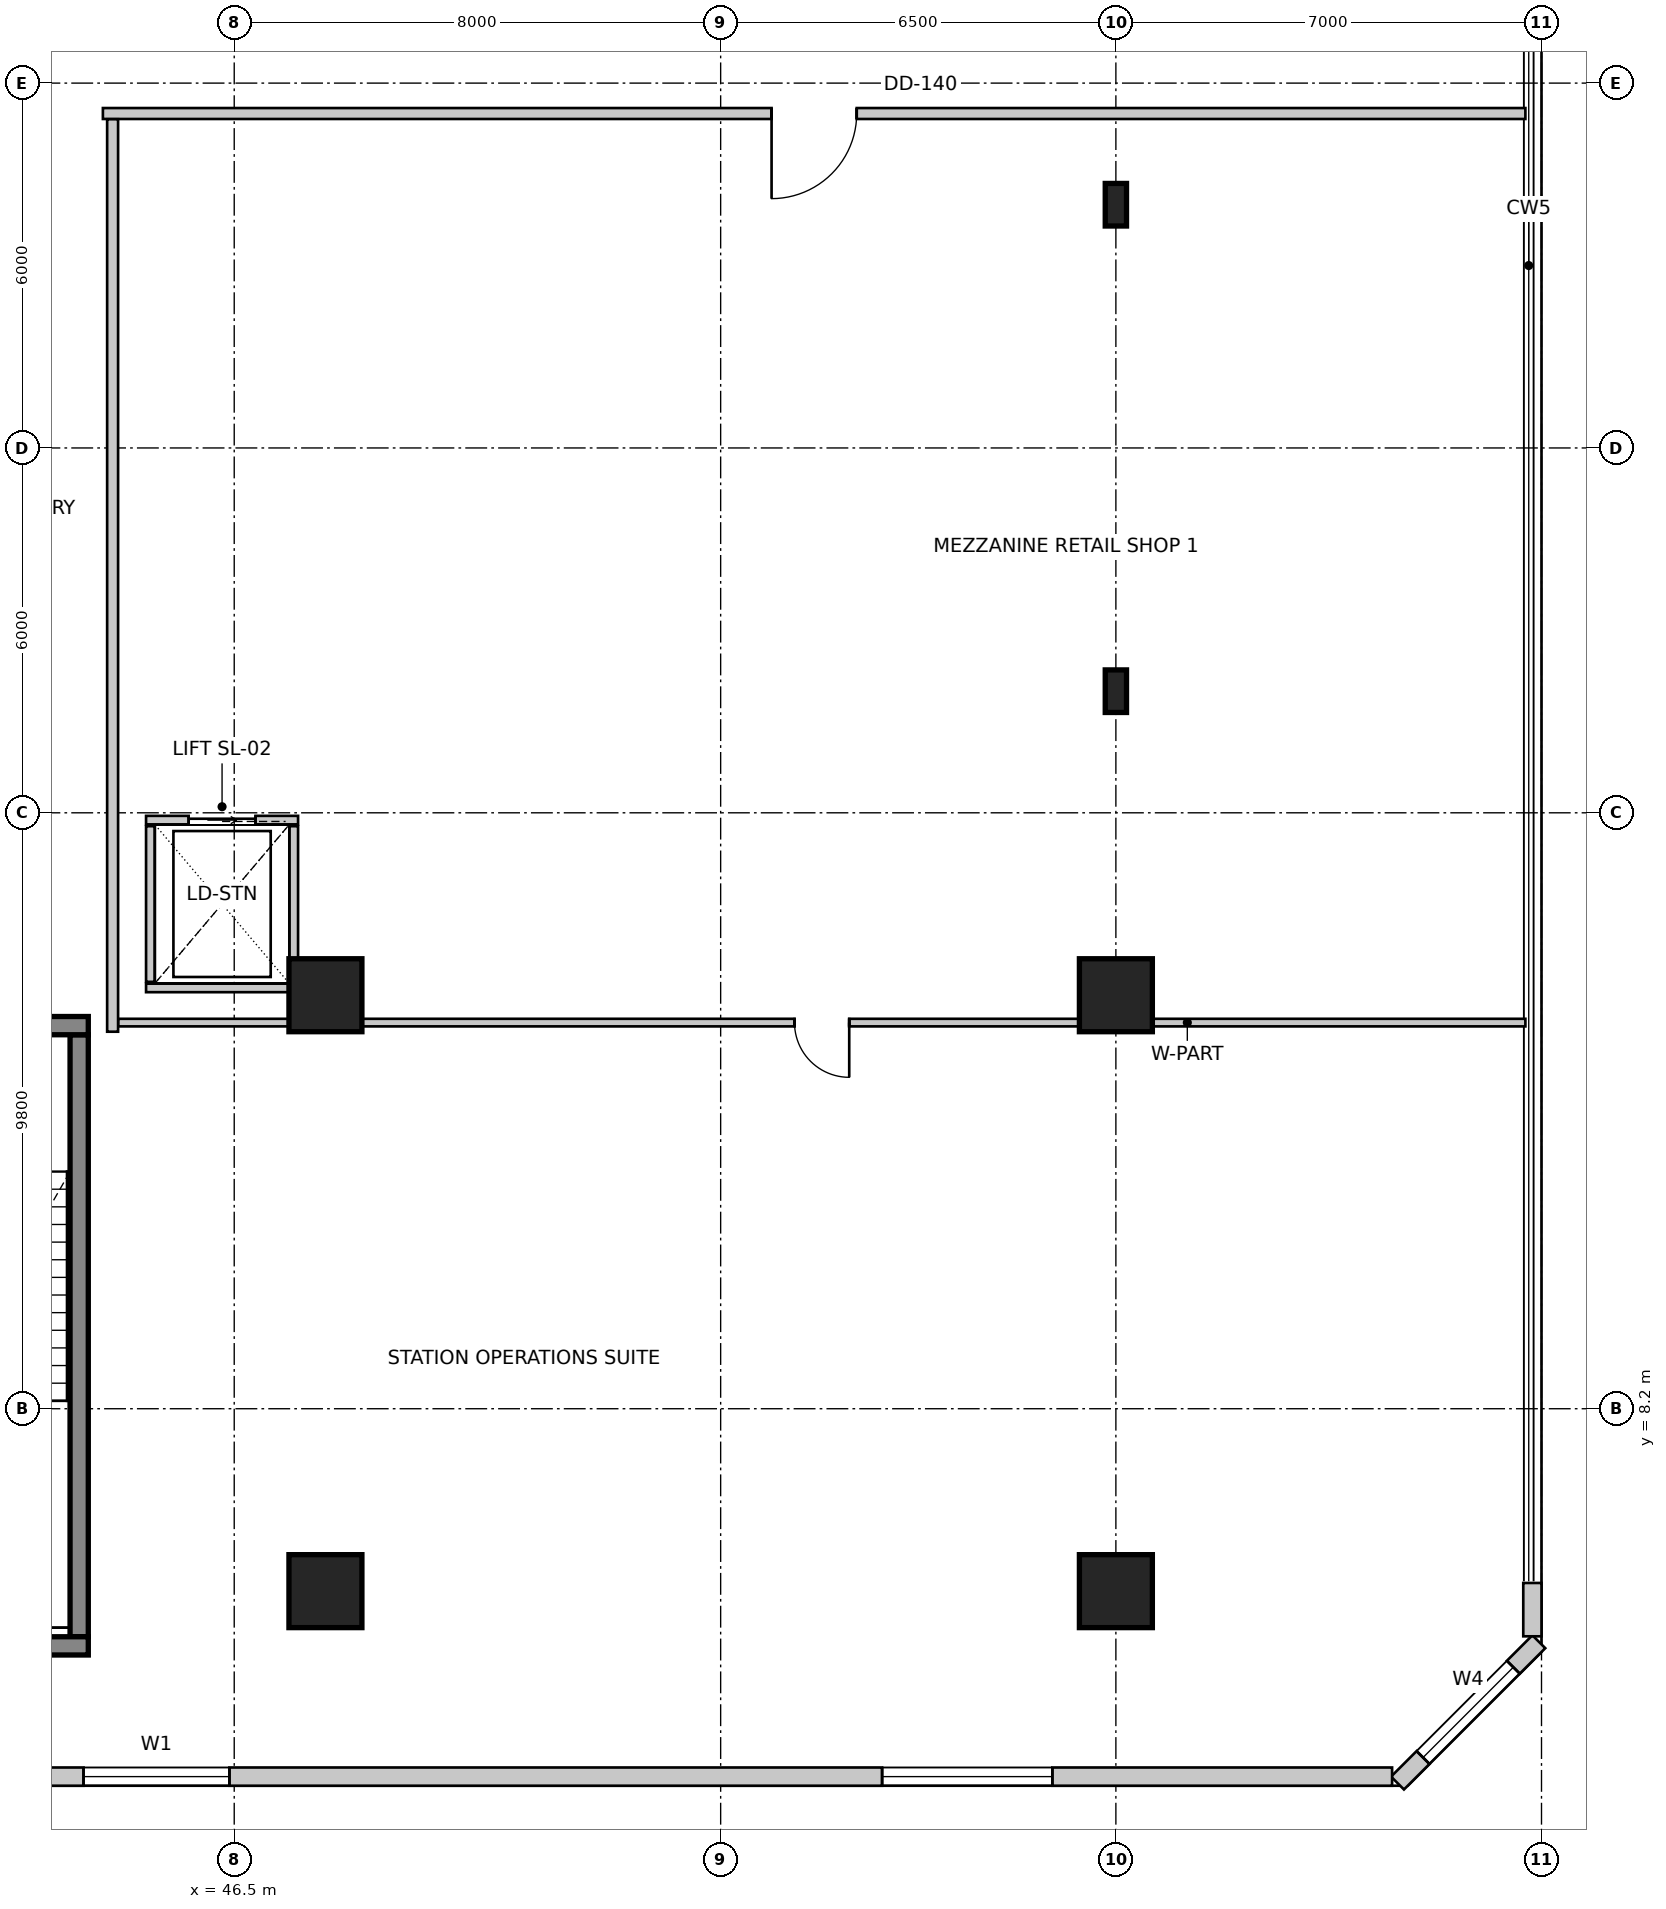
"""IFC4 building model, lengths in metres.
Left out: names, types, materials, properties, quantities, classifications, styles, units other than length and angle.
Written with IfcOpenShell. Run it as: python <this file> out.ifc"""

import sys

from ifc_helpers import new_model, si_unit, direction, frame, frame_2d, origin, origin_2d, place, context, subcontext, project, spatial, rectangle, extrude, source, transform, mapped, element, fill, save


model = new_model("IFC4")
c1 = context("Model", 3, precision=1e-05, world=origin(), true_north=direction((0.0, 1.0)))
c2 = subcontext(c1, "Body", "Model", "MODEL_VIEW")
j1 = project(units=[si_unit("LENGTHUNIT", "METRE"), si_unit("PLANEANGLEUNIT", "RADIAN")], contexts=[c1])
p1 = place(None, origin())
s1 = spatial("IfcSite", under=j1, at=p1, CompositionType="ELEMENT")
p2 = place(p1, origin())
s2 = spatial("IfcBuilding", under=s1, at=p2, CompositionType="ELEMENT")
p3 = place(p2, frame((0.0, 0.0, 6.0)))
s3 = spatial("IfcBuildingStorey", under=s2, at=p3, CompositionType="ELEMENT", Elevation=6.0)
p4 = place(p3, frame((43.95, 4.45, 0.0), z_axis=(0.0, 0.0, 1.0), x_axis=(0.0, 1.0, 0.0)))
e1 = element("IfcWall", 1, at=p4, inside=s3, PredefinedType="SHEAR", context=c2, shape_type="SweptSolid", body=[
    extrude(rectangle(XDim=9.9, YDim=0.3, at=frame_2d((4.95, 0.0))), origin(), (0.0, 0.0, 1.0), 5.2),
])
p5 = place(p3, frame((39.2, 4.3, 0.0), z_axis=(0.0, 0.0, 1.0), x_axis=(1.0, 0.0, 0.0)))
e2 = element("IfcWall", 2, at=p5, inside=s3, PredefinedType="SHEAR", context=c2, shape_type="SweptSolid", body=[
    extrude(rectangle(XDim=4.9, YDim=0.3, at=frame_2d((2.45, 0.0))), origin(), (0.0, 0.0, 1.0), 5.2),
])
p6 = place(p3, frame((39.2, 14.5, 0.0), z_axis=(0.0, 0.0, 1.0), x_axis=(1.0, 0.0, 0.0)))
e3 = element("IfcWall", 3, at=p6, inside=s3, PredefinedType="SHEAR", context=c2, shape_type="SweptSolid", body=[
    extrude(rectangle(XDim=4.9, YDim=0.3, at=frame_2d((2.45, 0.0))), origin(), (0.0, 0.0, 1.0), 5.2),
])
m1 = source(origin(), c2, "Body", "SweptSolid", [
    extrude(rectangle(XDim=1.1, YDim=2.15, at=frame_2d((0.55, 1.075))), frame((0.0, 0.16, 0.0), z_axis=(0.0, -1.0, 0.0), x_axis=(1.0, 0.0, 0.0)), (0.0, 0.0, 1.0), 0.32),
])
p7 = place(p6, frame((1.9, 0.0, 0.0)))
e4 = element("IfcOpeningElement", 4, at=p7, cuts=e3, PredefinedType="OPENING", context=c2, shape_type="MappedRepresentation", body=[
    mapped(m1, transform((0.0, 0.0, 0.0), scale=1.0)),
])
m2 = source(origin(), c2, "Body", "SweptSolid", [
    extrude(rectangle(XDim=1.2, YDim=1.2, at=origin_2d()), origin(), (0.0, 0.0, 1.0), 5.2),
])
for number, where, z_axis, x_axis in (
    (5, (48.0, 5.2, 0.0), (0.0, 0.0, 1.0), (1.0, 0.0, 0.0)),
    (6, (61.0, 5.2, 0.0), (0.0, 0.0, 1.0), (1.0, 0.0, 0.0)),
    (7, (48.0, 15.0, 0.0), (0.0, 0.0, 1.0), (1.0, 0.0, 0.0)),
    (8, (61.0, 15.0, 0.0), (0.0, 0.0, 1.0), (1.0, 0.0, 0.0)),
):
    element("IfcColumn", number, at=place(p3, frame(where, z_axis=z_axis, x_axis=x_axis)), inside=s3, PredefinedType="COLUMN", context=c2, shape_type="MappedRepresentation", body=[
        mapped(m2, transform((0.0, 0.0, 0.0), scale=1.0)),
    ])
m3 = source(origin(), c2, "Body", "SweptSolid", [
    extrude(rectangle(XDim=0.35, YDim=0.7, at=origin_2d()), origin(), (0.0, 0.0, 1.0), 5.2),
])
for number, where, z_axis, x_axis in (
    (9, (61.0, 20.0, 0.0), (0.0, 0.0, 1.0), (1.0, 0.0, 0.0)),
    (10, (61.0, 28.0, 0.0), (0.0, 0.0, 1.0), (1.0, 0.0, 0.0)),
):
    element("IfcColumn", number, at=place(p3, frame(where, z_axis=z_axis, x_axis=x_axis)), inside=s3, PredefinedType="PILASTER", context=c2, shape_type="MappedRepresentation", body=[
        mapped(m3, transform((0.0, 0.0, 0.0), scale=1.0)),
    ])
p8 = place(p3, frame((65.632, 2.044, 0.0), z_axis=(0.0, 0.0, 1.0), x_axis=(0.707106781187, 0.707106781187, 0.0)))
e11 = element("IfcWall", 11, at=p8, inside=s3, PredefinedType="SOLIDWALL", context=c2, shape_type="SweptSolid", body=[
    extrude(rectangle(XDim=3.287, YDim=0.3, at=frame_2d((1.644, 0.0))), origin(), (0.0, 0.0, 1.0), 4.9),
])
m4 = source(origin(), c2, "Body", "SweptSolid", [
    extrude(rectangle(XDim=2.1, YDim=2.0, at=frame_2d((1.05, 1.0))), frame((0.0, 0.16, 0.0), z_axis=(0.0, -1.0, 0.0), x_axis=(1.0, 0.0, 0.0)), (0.0, 0.0, 1.0), 0.32),
])
p9 = place(p8, frame((0.594, 0.0, 0.85)))
e12 = element("IfcOpeningElement", 12, at=p9, cuts=e11, PredefinedType="OPENING", context=c2, shape_type="MappedRepresentation", body=[
    mapped(m4, transform((0.0, 0.0, 0.0), scale=1.0)),
])
p10 = place(p3, frame((67.85, 4.457, 0.0), z_axis=(0.0, 0.0, 1.0), x_axis=(0.0, 1.0, 0.0)))
e13 = element("IfcWall", 13, at=p10, inside=s3, PredefinedType="SOLIDWALL", context=c2, shape_type="SweptSolid", body=[
    extrude(rectangle(XDim=0.877, YDim=0.3, at=frame_2d((0.439, 0.0))), origin(), (0.0, 0.0, 1.0), 4.9),
])
p11 = place(p3, frame((4.457, 2.15, 0.0), z_axis=(0.0, 0.0, 1.0), x_axis=(1.0, 0.0, 0.0)))
e14 = element("IfcWall", 14, at=p11, inside=s3, PredefinedType="SOLIDWALL", context=c2, shape_type="SweptSolid", body=[
    extrude(rectangle(XDim=61.085, YDim=0.3, at=frame_2d((30.543, 0.0))), origin(), (0.0, 0.0, 1.0), 4.9),
])
m5 = source(origin(), c2, "Body", "SweptSolid", [
    extrude(rectangle(XDim=2.8, YDim=2.4, at=frame_2d((1.4, 1.2))), frame((0.0, 0.16, 0.0), z_axis=(0.0, -1.0, 0.0), x_axis=(1.0, 0.0, 0.0)), (0.0, 0.0, 1.0), 0.32),
])
p12 = place(p11, frame((2.254, 0.0, 0.85)))
e15 = element("IfcOpeningElement", 15, at=p12, cuts=e14, PredefinedType="OPENING", context=c2, shape_type="MappedRepresentation", body=[
    mapped(m5, transform((0.0, 0.0, 0.0), scale=1.0)),
])
m6 = source(origin(), c2, "Body", "SweptSolid", [
    extrude(rectangle(XDim=2.4, YDim=2.2, at=frame_2d((1.2, 1.1))), frame((0.0, 0.16, 0.0), z_axis=(0.0, -1.0, 0.0), x_axis=(1.0, 0.0, 0.0)), (0.0, 0.0, 1.0), 0.32),
])
p13 = place(p11, frame((9.121, 0.0, 0.85)))
e16 = element("IfcOpeningElement", 16, at=p13, cuts=e14, PredefinedType="OPENING", context=c2, shape_type="MappedRepresentation", body=[
    mapped(m6, transform((0.0, 0.0, 0.0), scale=1.0)),
])
p14 = place(p11, frame((15.589, 0.0, 0.85)))
e17 = element("IfcOpeningElement", 17, at=p14, cuts=e14, PredefinedType="OPENING", context=c2, shape_type="MappedRepresentation", body=[
    mapped(m5, transform((0.0, 0.0, 0.0), scale=1.0)),
])
p15 = place(p11, frame((26.03, 0.0, 0.85)))
e18 = element("IfcOpeningElement", 18, at=p15, cuts=e14, PredefinedType="OPENING", context=c2, shape_type="MappedRepresentation", body=[
    mapped(m5, transform((0.0, 0.0, 0.0), scale=1.0)),
])
p16 = place(p11, frame((39.564, 0.0, 0.85)))
e19 = element("IfcOpeningElement", 19, at=p16, cuts=e14, PredefinedType="OPENING", context=c2, shape_type="MappedRepresentation", body=[
    mapped(m6, transform((0.0, 0.0, 0.0), scale=1.0)),
])
p17 = place(p11, frame((52.698, 0.0, 0.85)))
e20 = element("IfcOpeningElement", 20, at=p17, cuts=e14, PredefinedType="OPENING", context=c2, shape_type="MappedRepresentation", body=[
    mapped(m5, transform((0.0, 0.0, 0.0), scale=1.0)),
])
p18 = place(p3, frame((45.05, 17.88, 0.0), z_axis=(0.0, 0.0, 1.0), x_axis=(1.0, 0.0, 0.0)))
e21 = element("IfcWall", 21, at=p18, inside=s3, PredefinedType="SOLIDWALL", context=c2, shape_type="SweptSolid", body=[
    extrude(rectangle(XDim=2.5, YDim=0.14, at=frame_2d((1.25, 0.0))), origin(), (0.0, 0.0, 1.0), 4.9),
])
m7 = source(origin(), c2, "Body", "SweptSolid", [
    extrude(rectangle(XDim=1.1, YDim=2.15, at=frame_2d((0.55, 1.075))), frame((0.0, 0.08, 0.0), z_axis=(0.0, -1.0, 0.0), x_axis=(1.0, 0.0, 0.0)), (0.0, 0.0, 1.0), 0.16),
])
p19 = place(p18, frame((0.7, 0.0, 0.0)))
e22 = element("IfcOpeningElement", 22, at=p19, cuts=e21, PredefinedType="OPENING", context=c2, shape_type="MappedRepresentation", body=[
    mapped(m7, transform((0.0, 0.0, 0.0), scale=1.0)),
])
p20 = place(p3, frame((45.05, 15.12, 0.0), z_axis=(0.0, 0.0, 1.0), x_axis=(1.0, 0.0, 0.0)))
e23 = element("IfcWall", 23, at=p20, inside=s3, PredefinedType="SOLIDWALL", context=c2, shape_type="SweptSolid", body=[
    extrude(rectangle(XDim=2.5, YDim=0.14, at=frame_2d((1.25, 0.0))), origin(), (0.0, 0.0, 1.0), 3.692),
])
p21 = place(p3, frame((45.12, 15.22, 0.0), z_axis=(0.0, 0.0, 1.0), x_axis=(0.0, 1.0, 0.0)))
e24 = element("IfcWall", 24, at=p21, inside=s3, PredefinedType="SOLIDWALL", context=c2, shape_type="SweptSolid", body=[
    extrude(rectangle(XDim=2.56, YDim=0.14, at=frame_2d((1.28, 0.0))), origin(), (0.0, 0.0, 1.0), 3.692),
])
p22 = place(p3, frame((47.48, 15.22, 0.0), z_axis=(0.0, 0.0, 1.0), x_axis=(0.0, 1.0, 0.0)))
e25 = element("IfcWall", 25, at=p22, inside=s3, PredefinedType="SOLIDWALL", context=c2, shape_type="SweptSolid", body=[
    extrude(rectangle(XDim=2.56, YDim=0.14, at=frame_2d((1.28, 0.0))), origin(), (0.0, 0.0, 1.0), 3.092),
])
p23 = place(p3, frame((67.735, 29.5, 0.0), z_axis=(0.0, 0.0, 1.0), x_axis=(-1.0, 0.0, 0.0)))
e26 = element("IfcWall", 26, at=p23, inside=s3, PredefinedType="PARTITIONING", context=c2, shape_type="SweptSolid", body=[
    extrude(rectangle(XDim=23.395, YDim=0.18, at=frame_2d((11.698, 0.0))), origin(), (0.0, 0.0, 1.0), 3.092),
])
m8 = source(origin(), c2, "Body", "SweptSolid", [
    extrude(rectangle(XDim=1.4, YDim=2.15, at=frame_2d((0.7, 1.075))), frame((0.0, 0.1, 0.0), z_axis=(0.0, -1.0, 0.0), x_axis=(1.0, 0.0, 0.0)), (0.0, 0.0, 1.0), 0.2),
])
p24 = place(p23, frame((10.998, 0.0, 0.0)))
e27 = element("IfcOpeningElement", 27, at=p24, cuts=e26, PredefinedType="OPENING", context=c2, shape_type="MappedRepresentation", body=[
    mapped(m8, transform((0.0, 0.0, 0.0), scale=1.0)),
])
p25 = place(p3, frame((44.5, 29.406, 0.0), z_axis=(0.0, 0.0, 1.0), x_axis=(0.0, -1.0, 0.0)))
e28 = element("IfcWall", 28, at=p25, inside=s3, PredefinedType="PARTITIONING", context=c2, shape_type="SweptSolid", body=[
    extrude(rectangle(XDim=15.006, YDim=0.18, at=frame_2d((7.503, 0.0))), origin(), (0.0, 0.0, 1.0), 3.692),
])
p26 = place(p3, frame((67.735, 14.55, 0.0), z_axis=(0.0, 0.0, 1.0), x_axis=(-1.0, 0.0, 0.0)))
e29 = element("IfcWall", 29, at=p26, inside=s3, PredefinedType="PARTITIONING", context=c2, shape_type="SweptSolid", body=[
    extrude(rectangle(XDim=23.141, YDim=0.125, at=frame_2d((11.571, 0.0))), origin(), (0.0, 0.0, 1.0), 3.942),
])
m9 = source(origin(), c2, "Body", "SweptSolid", [
    extrude(rectangle(XDim=0.9, YDim=2.15, at=frame_2d((0.45, 1.075))), frame((0.0, 0.073, 0.0), z_axis=(0.0, -1.0, 0.0), x_axis=(1.0, 0.0, 0.0)), (0.0, 0.0, 1.0), 0.145),
])
p27 = place(p26, frame((11.121, 0.0, 0.0)))
e30 = element("IfcOpeningElement", 30, at=p27, cuts=e29, PredefinedType="OPENING", context=c2, shape_type="MappedRepresentation", body=[
    mapped(m9, transform((0.0, 0.0, 0.0), scale=1.0)),
])
m10 = source(origin(), c2, "Body", "SweptSolid", [
    extrude(rectangle(XDim=2.1, YDim=2.0, at=frame_2d((1.05, 1.0))), frame((0.0, -0.015, 0.0), z_axis=(0.0, -1.0, 0.0), x_axis=(1.0, 0.0, 0.0)), (0.0, 0.0, 1.0), 0.06),
])
p28 = place(p9, origin())
e31 = element("IfcWindow", 31, at=p28, inside=s3, PartitioningType="SINGLE_PANEL", PredefinedType="WINDOW", context=c2, shape_type="MappedRepresentation", body=[
    mapped(m10, transform((0.0, 0.0, 0.0), scale=1.0)),
])
fill(e12, e31)
m11 = source(origin(), c2, "Body", "SweptSolid", [
    extrude(rectangle(XDim=2.4, YDim=2.2, at=frame_2d((1.2, 1.1))), frame((0.0, -0.015, 0.0), z_axis=(0.0, -1.0, 0.0), x_axis=(1.0, 0.0, 0.0)), (0.0, 0.0, 1.0), 0.06),
])
p29 = place(p16, origin())
e32 = element("IfcWindow", 32, at=p29, inside=s3, PartitioningType="SINGLE_PANEL", PredefinedType="WINDOW", context=c2, shape_type="MappedRepresentation", body=[
    mapped(m11, transform((0.0, 0.0, 0.0), scale=1.0)),
])
fill(e19, e32)
m12 = source(origin(), c2, "Body", "SweptSolid", [
    extrude(rectangle(XDim=2.8, YDim=2.4, at=frame_2d((1.4, 1.2))), frame((0.0, -0.015, 0.0), z_axis=(0.0, -1.0, 0.0), x_axis=(1.0, 0.0, 0.0)), (0.0, 0.0, 1.0), 0.06),
])
p30 = place(p17, origin())
e33 = element("IfcWindow", 33, at=p30, inside=s3, PartitioningType="SINGLE_PANEL", PredefinedType="WINDOW", context=c2, shape_type="MappedRepresentation", body=[
    mapped(m12, transform((0.0, 0.0, 0.0), scale=1.0)),
])
fill(e20, e33)
m13 = source(origin(), c2, "Body", "SweptSolid", [
    extrude(rectangle(XDim=1.1, YDim=2.15, at=frame_2d((0.55, 1.075))), frame((0.0, 0.025, 0.0), z_axis=(0.0, -1.0, 0.0), x_axis=(1.0, 0.0, 0.0)), (0.0, 0.0, 1.0), 0.05),
])
p31 = place(p19, origin())
e34 = element("IfcDoor", 34, at=p31, inside=s3, OperationType="SLIDING_TO_RIGHT", PredefinedType="DOOR", context=c2, shape_type="MappedRepresentation", body=[
    mapped(m13, transform((0.0, 0.0, 0.0), scale=1.0)),
])
fill(e22, e34)
m14 = source(origin(), c2, "Body", "SweptSolid", [
    extrude(rectangle(XDim=1.4, YDim=2.15, at=frame_2d((0.7, 1.075))), frame((0.0, 0.025, 0.0), z_axis=(0.0, -1.0, 0.0), x_axis=(1.0, 0.0, 0.0)), (0.0, 0.0, 1.0), 0.05),
])
p32 = place(p24, origin())
e35 = element("IfcDoor", 35, at=p32, inside=s3, OperationType="SINGLE_SWING_RIGHT", PredefinedType="DOOR", context=c2, shape_type="MappedRepresentation", body=[
    mapped(m14, transform((0.0, 0.0, 0.0), scale=1.0)),
])
fill(e27, e35)
m15 = source(origin(), c2, "Body", "SweptSolid", [
    extrude(rectangle(XDim=0.9, YDim=2.15, at=frame_2d((0.45, 1.075))), frame((0.0, 0.025, 0.0), z_axis=(0.0, -1.0, 0.0), x_axis=(1.0, 0.0, 0.0)), (0.0, 0.0, 1.0), 0.05),
])
p33 = place(p27, origin())
e36 = element("IfcDoor", 36, at=p33, inside=s3, OperationType="SINGLE_SWING_LEFT", PredefinedType="DOOR", context=c2, shape_type="MappedRepresentation", body=[
    mapped(m15, transform((0.0, 0.0, 0.0), scale=1.0)),
])
fill(e30, e36)
save(model, sys.argv[1])
